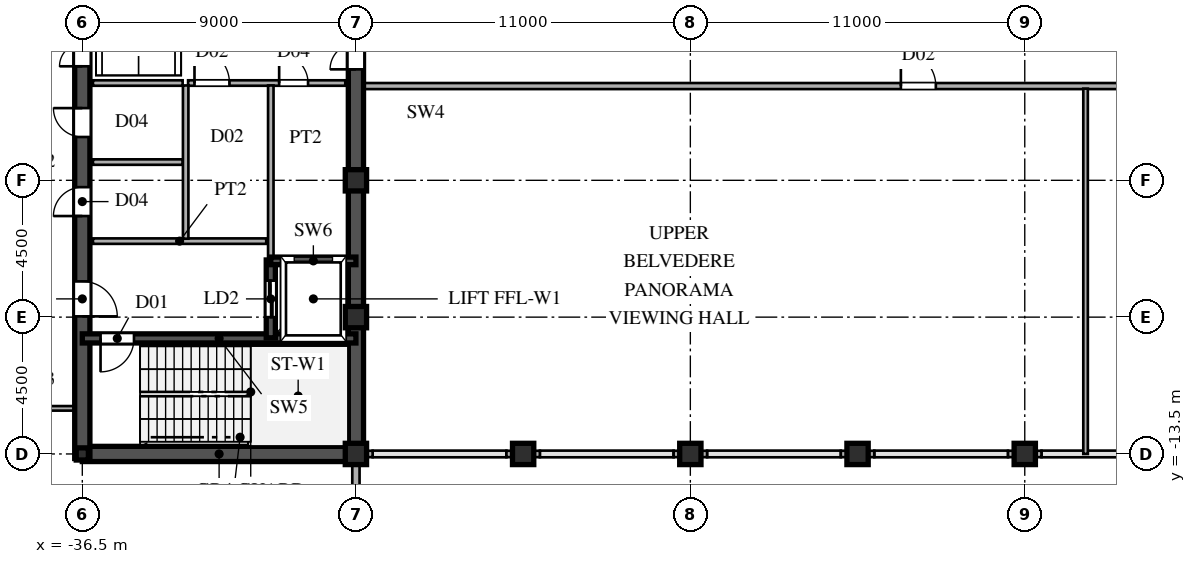
"""IFC4 building model, lengths in metres.
Left out: names, types, materials, properties, quantities, classifications, styles, units other than length and angle.
Written with IfcOpenShell. Run it as: python <this file> out.ifc"""

import sys

from ifc_helpers import new_model, si_unit, direction, frame, frame_2d, origin, origin_2d, place, context, subcontext, project, spatial, rectangle, hollow_rectangle, i_section, extrude, source, transform, mapped, element, fill, save


model = new_model("IFC4")
c1 = context("Model", 3, precision=1e-05, world=origin(), true_north=direction((0.0, 1.0)))
c2 = subcontext(c1, "Body", "Model", "MODEL_VIEW")
j1 = project(units=[si_unit("LENGTHUNIT", "METRE"), si_unit("PLANEANGLEUNIT", "RADIAN")], contexts=[c1])
p1 = place(None, origin())
s1 = spatial("IfcSite", under=j1, at=p1, CompositionType="ELEMENT")
p2 = place(p1, origin())
s2 = spatial("IfcBuilding", under=s1, at=p2, CompositionType="ELEMENT")
p3 = place(p2, frame((0.0, 0.0, 274.2)))
s3 = spatial("IfcBuildingStorey", under=s2, at=p3, CompositionType="ELEMENT", Elevation=274.2)
m1 = source(origin(), c2, "Body", "SweptSolid", [
    extrude(hollow_rectangle(XDim=0.7, YDim=0.7, WallThickness=0.03, at=origin_2d()), origin(), (0.0, 0.0, 1.0), 4.8),
])
for number, where, z_axis, x_axis in (
    (1, (-27.5, -13.5, 0.0), (0.0, 0.0, 1.0), (1.0, 0.0, 0.0)),
    (2, (-27.5, -9.0, 0.0), (0.0, 0.0, 1.0), (1.0, 0.0, 0.0)),
    (3, (-27.5, -4.5, 0.0), (0.0, 0.0, 1.0), (1.0, 0.0, 0.0)),
):
    element("IfcColumn", number, at=place(p3, frame(where, z_axis=z_axis, x_axis=x_axis)), inside=s3, PredefinedType="COLUMN", context=c2, shape_type="MappedRepresentation", body=[
        mapped(m1, transform((0.0, 0.0, 0.0), scale=1.0)),
    ])
m2 = source(origin(), c2, "Body", "SweptSolid", [
    extrude(i_section(OverallWidth=0.4, OverallDepth=0.4, WebThickness=0.013, FlangeThickness=0.021, at=origin_2d()), origin(), (0.0, 0.0, 1.0), 4.8),
])
p4 = place(p3, frame((-36.5, -13.5, 0.0), z_axis=(0.0, 0.0, 1.0), x_axis=(1.0, 0.0, 0.0)))
e4 = element("IfcColumn", 4, at=p4, inside=s3, PredefinedType="COLUMN", context=c2, shape_type="MappedRepresentation", body=[
    mapped(m2, transform((0.0, 0.0, 0.0), scale=1.0)),
])
for number, where, z_axis, x_axis in (
    (5, (-22.0, -13.5, 0.0), (0.0, 0.0, 1.0), (1.0, 0.0, 0.0)),
    (6, (-16.5, -13.5, 0.0), (0.0, 0.0, 1.0), (1.0, 0.0, 0.0)),
    (7, (-11.0, -13.5, 0.0), (0.0, 0.0, 1.0), (1.0, 0.0, 0.0)),
    (8, (-5.5, -13.5, 0.0), (0.0, 0.0, 1.0), (1.0, 0.0, 0.0)),
):
    element("IfcColumn", number, at=place(p3, frame(where, z_axis=z_axis, x_axis=x_axis)), inside=s3, PredefinedType="COLUMN", context=c2, shape_type="MappedRepresentation", body=[
        mapped(m1, transform((0.0, 0.0, 0.0), scale=1.0)),
    ])
p5 = place(p3, frame((-27.5, -15.98, 0.0), z_axis=(0.0, 0.0, 1.0), x_axis=(0.0, 1.0, 0.0)))
e9 = element("IfcWall", 9, at=p5, inside=s3, PredefinedType="SOLIDWALL", context=c2, shape_type="SweptSolid", body=[
    extrude(rectangle(XDim=1.605, YDim=0.24, at=frame_2d((0.803, 0.0))), origin(), (0.0, 0.0, 1.0), 4.52),
])
p6 = place(p3, frame((-27.5, -14.375, 0.0), z_axis=(0.0, 0.0, 1.0), x_axis=(0.0, 1.0, 0.0)))
e10 = element("IfcWall", 10, at=p6, inside=s3, PredefinedType="SOLIDWALL", context=c2, shape_type="SweptSolid", body=[
    extrude(rectangle(XDim=0.62, YDim=0.24, at=frame_2d((0.31, 0.0))), origin(), (0.0, 0.0, 1.0), 4.02),
])
p7 = place(p3, frame((-27.49, -13.5, 0.0), z_axis=(0.0, 0.0, 1.0), x_axis=(1.0, 0.0, 0.0)))
e11 = element("IfcWall", 11, at=p7, inside=s3, PredefinedType="SOLIDWALL", context=c2, shape_type="SweptSolid", body=[
    extrude(rectangle(XDim=0.54, YDim=0.21, at=frame_2d((0.27, 0.0))), origin(), (0.0, 0.0, 1.0), 4.02),
])
for number, where, z_axis, x_axis in (
    (12, (-22.55, -13.5, 0.0), (0.0, 0.0, 1.0), (1.0, 0.0, 0.0)),
    (13, (-17.05, -13.5, 0.0), (0.0, 0.0, 1.0), (1.0, 0.0, 0.0)),
    (14, (-11.55, -13.5, 0.0), (0.0, 0.0, 1.0), (1.0, 0.0, 0.0)),
    (15, (-6.05, -13.5, 0.0), (0.0, 0.0, 1.0), (1.0, 0.0, 0.0)),
):
    element("IfcWall", number, at=place(p3, frame(where, z_axis=z_axis, x_axis=x_axis)), inside=s3, PredefinedType="SOLIDWALL", context=c2, shape_type="SweptSolid", body=[
        extrude(rectangle(XDim=1.1, YDim=0.21, at=frame_2d((0.55, 0.0))), origin(), (0.0, 0.0, 1.0), 4.02),
    ])
p8 = place(p3, frame((-27.5, -13.5, 0.0), z_axis=(0.0, 0.0, 1.0), x_axis=(0.0, 1.0, 0.0)))
e16 = element("IfcWall", 16, at=p8, inside=s3, PredefinedType="SHEAR", context=c2, shape_type="SweptSolid", body=[
    extrude(rectangle(XDim=12.2, YDim=0.5, at=frame_2d((6.1, 0.0))), origin(), (0.0, 0.0, 1.0), 4.52),
])
p9 = place(p3, frame((-27.5, -1.3, 0.0), z_axis=(0.0, 0.0, 1.0), x_axis=(0.0, 1.0, 0.0)))
e17 = element("IfcWall", 17, at=p9, inside=s3, PredefinedType="SHEAR", context=c2, shape_type="SweptSolid", body=[
    extrude(rectangle(XDim=2.6, YDim=0.5, at=frame_2d((1.3, 0.0))), origin(), (0.0, 0.0, 1.0), 4.52),
])
p10 = place(p9, frame((0.45, 0.0, 0.0)))
e18 = element("IfcOpeningElement", 18, at=p10, cuts=e17, PredefinedType="OPENING", context=c2, shape_type="SweptSolid", body=[
    extrude(rectangle(XDim=1.7, YDim=2.35, at=frame_2d((0.85, 1.175))), frame((0.0, 0.26, 0.0), z_axis=(0.0, -1.0, 0.0), x_axis=(1.0, 0.0, 0.0)), (0.0, 0.0, 1.0), 0.52),
])
p11 = place(p3, frame((-36.5, -13.5, 0.0), z_axis=(0.0, 0.0, 1.0), x_axis=(1.0, 0.0, 0.0)))
e19 = element("IfcWall", 19, at=p11, inside=s3, PredefinedType="SHEAR", context=c2, shape_type="SweptSolid", body=[
    extrude(rectangle(XDim=9.0, YDim=0.5, at=frame_2d((4.5, 0.0))), origin(), (0.0, 0.0, 1.0), 4.52),
])
p12 = place(p3, frame((-36.5, -13.65, 0.0), z_axis=(0.0, 0.0, 1.0), x_axis=(0.0, 1.0, 0.0)))
e20 = element("IfcWall", 20, at=p12, inside=s3, PredefinedType="SHEAR", context=c2, shape_type="SweptSolid", body=[
    extrude(rectangle(XDim=7.15, YDim=0.5, at=frame_2d((3.575, 0.0))), origin(), (0.0, 0.0, 1.0), 4.52),
])
p13 = place(p12, frame((4.675, 0.0, 0.0)))
e21 = element("IfcOpeningElement", 21, at=p13, cuts=e20, PredefinedType="OPENING", context=c2, shape_type="SweptSolid", body=[
    extrude(rectangle(XDim=1.15, YDim=2.2, at=frame_2d((0.575, 1.1))), frame((0.0, 0.26, 0.0), z_axis=(0.0, -1.0, 0.0), x_axis=(1.0, 0.0, 0.0)), (0.0, 0.0, 1.0), 0.52),
])
p14 = place(p3, frame((-36.5, -1.3, 0.0), z_axis=(0.0, 0.0, 1.0), x_axis=(0.0, 1.0, 0.0)))
e22 = element("IfcWall", 22, at=p14, inside=s3, PredefinedType="SHEAR", context=c2, shape_type="SweptSolid", body=[
    extrude(rectangle(XDim=2.6, YDim=0.5, at=frame_2d((1.3, 0.0))), origin(), (0.0, 0.0, 1.0), 4.52),
])
p15 = place(p14, frame((0.55, 0.0, 0.0)))
e23 = element("IfcOpeningElement", 23, at=p15, cuts=e22, PredefinedType="OPENING", context=c2, shape_type="SweptSolid", body=[
    extrude(rectangle(XDim=1.5, YDim=2.3, at=frame_2d((0.75, 1.15))), frame((0.0, 0.26, 0.0), z_axis=(0.0, -1.0, 0.0), x_axis=(1.0, 0.0, 0.0)), (0.0, 0.0, 1.0), 0.52),
])
p16 = place(p3, frame((-36.5, -6.5, 0.0), z_axis=(0.0, 0.0, 1.0), x_axis=(0.0, 1.0, 0.0)))
e24 = element("IfcWall", 24, at=p16, inside=s3, PredefinedType="SHEAR", context=c2, shape_type="SweptSolid", body=[
    extrude(rectangle(XDim=2.6, YDim=0.5, at=frame_2d((1.3, 0.0))), origin(), (0.0, 0.0, 1.0), 4.52),
])
p17 = place(p16, frame((0.825, 0.0, 0.0)))
e25 = element("IfcOpeningElement", 25, at=p17, cuts=e24, PredefinedType="OPENING", context=c2, shape_type="SweptSolid", body=[
    extrude(rectangle(XDim=0.95, YDim=2.15, at=frame_2d((0.475, 1.075))), frame((0.0, 0.26, 0.0), z_axis=(0.0, -1.0, 0.0), x_axis=(1.0, 0.0, 0.0)), (0.0, 0.0, 1.0), 0.52),
])
p18 = place(p3, frame((-36.5, -3.9, 0.0), z_axis=(0.0, 0.0, 1.0), x_axis=(0.0, 1.0, 0.0)))
e26 = element("IfcWall", 26, at=p18, inside=s3, PredefinedType="SHEAR", context=c2, shape_type="SweptSolid", body=[
    extrude(rectangle(XDim=2.6, YDim=0.5, at=frame_2d((1.3, 0.0))), origin(), (0.0, 0.0, 1.0), 4.52),
])
p19 = place(p18, frame((0.825, 0.0, 0.0)))
e27 = element("IfcOpeningElement", 27, at=p19, cuts=e26, PredefinedType="OPENING", context=c2, shape_type="SweptSolid", body=[
    extrude(rectangle(XDim=0.95, YDim=2.15, at=frame_2d((0.475, 1.075))), frame((0.0, 0.26, 0.0), z_axis=(0.0, -1.0, 0.0), x_axis=(1.0, 0.0, 0.0)), (0.0, 0.0, 1.0), 0.52),
])
p20 = place(p3, frame((-36.5, -9.7, 0.0), z_axis=(0.0, 0.0, 1.0), x_axis=(1.0, 0.0, 0.0)))
e28 = element("IfcWall", 28, at=p20, inside=s3, PredefinedType="SHEAR", context=c2, shape_type="SweptSolid", body=[
    extrude(rectangle(XDim=9.0, YDim=0.3, at=frame_2d((4.5, 0.0))), origin(), (0.0, 0.0, 1.0), 4.52),
])
p21 = place(p20, frame((0.6, 0.0, 0.0)))
e29 = element("IfcOpeningElement", 29, at=p21, cuts=e28, PredefinedType="OPENING", context=c2, shape_type="SweptSolid", body=[
    extrude(rectangle(XDim=1.1, YDim=2.2, at=frame_2d((0.55, 1.1))), frame((0.0, 0.16, 0.0), z_axis=(0.0, -1.0, 0.0), x_axis=(1.0, 0.0, 0.0)), (0.0, 0.0, 1.0), 0.32),
])
p22 = place(p3, frame((-30.3, -7.15, 0.0), z_axis=(0.0, 0.0, 1.0), x_axis=(1.0, 0.0, 0.0)))
e30 = element("IfcWall", 30, at=p22, inside=s3, PredefinedType="SHEAR", context=c2, shape_type="SweptSolid", body=[
    extrude(rectangle(XDim=2.8, YDim=0.25, at=frame_2d((1.4, 0.0))), origin(), (0.0, 0.0, 1.0), 4.52),
])
p23 = place(p3, frame((-30.3, -9.68, 0.0), z_axis=(0.0, 0.0, 1.0), x_axis=(0.0, 1.0, 0.0)))
e31 = element("IfcWall", 31, at=p23, inside=s3, PredefinedType="SHEAR", context=c2, shape_type="SweptSolid", body=[
    extrude(rectangle(XDim=2.56, YDim=0.3, at=frame_2d((1.28, 0.0))), origin(), (0.0, 0.0, 1.0), 4.52),
])
p24 = place(p23, frame((0.68, 0.0, 0.0)))
e32 = element("IfcOpeningElement", 32, at=p24, cuts=e31, PredefinedType="OPENING", context=c2, shape_type="SweptSolid", body=[
    extrude(rectangle(XDim=1.2, YDim=2.25, at=frame_2d((0.6, 1.125))), frame((0.0, 0.16, 0.0), z_axis=(0.0, -1.0, 0.0), x_axis=(1.0, 0.0, 0.0)), (0.0, 0.0, 1.0), 0.32),
])
p25 = place(p3, frame((-36.15, -6.5, 0.0), z_axis=(0.0, 0.0, 1.0), x_axis=(1.0, 0.0, 0.0)))
e33 = element("IfcWall", 33, at=p25, inside=s3, PredefinedType="PARTITIONING", context=c2, shape_type="SweptSolid", body=[
    extrude(rectangle(XDim=5.7, YDim=0.18, at=frame_2d((2.85, 0.0))), origin(), (0.0, 0.0, 1.0), 4.52),
])
p26 = place(p3, frame((-33.1, -6.42, 0.0), z_axis=(0.0, 0.0, 1.0), x_axis=(0.0, 1.0, 0.0)))
e34 = element("IfcWall", 34, at=p26, inside=s3, PredefinedType="PARTITIONING", context=c2, shape_type="SweptSolid", body=[
    extrude(rectangle(XDim=5.04, YDim=0.18, at=frame_2d((2.52, 0.0))), origin(), (0.0, 0.0, 1.0), 4.52),
])
p27 = place(p3, frame((-30.3, -1.3, 0.0), z_axis=(0.0, 0.0, 1.0), x_axis=(1.0, 0.0, 0.0)))
e35 = element("IfcWall", 35, at=p27, inside=s3, PredefinedType="PARTITIONING", context=c2, shape_type="SweptSolid", body=[
    extrude(rectangle(XDim=2.45, YDim=0.18, at=frame_2d((1.225, 0.0))), origin(), (0.0, 0.0, 1.0), 4.52),
])
p28 = place(p27, frame((0.275, 0.0, 0.0)))
e36 = element("IfcOpeningElement", 36, at=p28, cuts=e35, PredefinedType="OPENING", context=c2, shape_type="SweptSolid", body=[
    extrude(rectangle(XDim=0.95, YDim=2.15, at=frame_2d((0.475, 1.075))), frame((0.0, 0.1, 0.0), z_axis=(0.0, -1.0, 0.0), x_axis=(1.0, 0.0, 0.0)), (0.0, 0.0, 1.0), 0.2),
])
p29 = place(p3, frame((-33.02, -1.3, 0.0), z_axis=(0.0, 0.0, 1.0), x_axis=(1.0, 0.0, 0.0)))
e37 = element("IfcWall", 37, at=p29, inside=s3, PredefinedType="PARTITIONING", context=c2, shape_type="SweptSolid", body=[
    extrude(rectangle(XDim=2.72, YDim=0.18, at=frame_2d((1.36, 0.0))), origin(), (0.0, 0.0, 1.0), 4.52),
])
p30 = place(p29, frame((0.21, 0.0, 0.0)))
e38 = element("IfcOpeningElement", 38, at=p30, cuts=e37, PredefinedType="OPENING", context=c2, shape_type="SweptSolid", body=[
    extrude(rectangle(XDim=1.15, YDim=2.2, at=frame_2d((0.575, 1.1))), frame((0.0, 0.1, 0.0), z_axis=(0.0, -1.0, 0.0), x_axis=(1.0, 0.0, 0.0)), (0.0, 0.0, 1.0), 0.2),
])
p31 = place(p3, frame((-30.3, -7.12, 0.0), z_axis=(0.0, 0.0, 1.0), x_axis=(0.0, 1.0, 0.0)))
e39 = element("IfcWall", 39, at=p31, inside=s3, PredefinedType="PARTITIONING", context=c2, shape_type="SweptSolid", body=[
    extrude(rectangle(XDim=5.74, YDim=0.18, at=frame_2d((2.87, 0.0))), origin(), (0.0, 0.0, 1.0), 4.52),
])
for number, where, z_axis, x_axis in (
    (40, (-36.15, -1.3, 0.0), (0.0, 0.0, 1.0), (1.0, 0.0, 0.0)),
    (41, (-36.15, -3.9, 0.0), (0.0, 0.0, 1.0), (1.0, 0.0, 0.0)),
):
    element("IfcWall", number, at=place(p3, frame(where, z_axis=z_axis, x_axis=x_axis)), inside=s3, PredefinedType="PARTITIONING", context=c2, shape_type="SweptSolid", body=[
        extrude(rectangle(XDim=2.95, YDim=0.18, at=frame_2d((1.475, 0.0))), origin(), (0.0, 0.0, 1.0), 4.52),
    ])
p32 = place(p3, frame((-39.115, -12.0, 0.0), z_axis=(0.0, 0.0, 1.0), x_axis=(1.0, 0.0, 0.0)))
e42 = element("IfcWall", 42, at=p32, inside=s3, PredefinedType="PARTITIONING", context=c2, shape_type="SweptSolid", body=[
    extrude(rectangle(XDim=2.36, YDim=0.15, at=frame_2d((1.18, 0.0))), origin(), (0.0, 0.0, 1.0), 4.52),
])
p33 = place(p3, frame((-27.245, -1.4, 0.0), z_axis=(0.0, 0.0, 1.0), x_axis=(1.0, 0.0, 0.0)))
e43 = element("IfcWall", 43, at=p33, inside=s3, PredefinedType="PARTITIONING", context=c2, shape_type="SweptSolid", body=[
    extrude(rectangle(XDim=54.49, YDim=0.2, at=frame_2d((27.245, 0.0))), origin(), (0.0, 0.0, 1.0), 4.52),
])
p34 = place(p33, frame((17.67, 0.0, 0.0)))
e44 = element("IfcOpeningElement", 44, at=p34, cuts=e43, PredefinedType="OPENING", context=c2, shape_type="SweptSolid", body=[
    extrude(rectangle(XDim=1.15, YDim=2.2, at=frame_2d((0.575, 1.1))), frame((0.0, 0.11, 0.0), z_axis=(0.0, -1.0, 0.0), x_axis=(1.0, 0.0, 0.0)), (0.0, 0.0, 1.0), 0.22),
])
p35 = place(p33, frame((35.17, 0.0, 0.0)))
e45 = element("IfcOpeningElement", 45, at=p35, cuts=e43, PredefinedType="OPENING", context=c2, shape_type="SweptSolid", body=[
    extrude(rectangle(XDim=1.15, YDim=2.2, at=frame_2d((0.575, 1.1))), frame((0.0, 0.11, 0.0), z_axis=(0.0, -1.0, 0.0), x_axis=(1.0, 0.0, 0.0)), (0.0, 0.0, 1.0), 0.22),
])
p36 = place(p3, frame((-3.5, -13.5, 0.0), z_axis=(0.0, 0.0, 1.0), x_axis=(0.0, 1.0, 0.0)))
e46 = element("IfcWall", 46, at=p36, inside=s3, PredefinedType="PARTITIONING", context=c2, shape_type="SweptSolid", body=[
    extrude(rectangle(XDim=12.015, YDim=0.15, at=frame_2d((6.007, 0.0))), origin(), (0.0, 0.0, 1.0), 4.52),
])
m3 = source(origin(), c2, "Body", "SweptSolid", [
    extrude(rectangle(XDim=1.7, YDim=2.35, at=frame_2d((0.85, 1.175))), frame((0.0, 0.025, 0.0), z_axis=(0.0, -1.0, 0.0), x_axis=(1.0, 0.0, 0.0)), (0.0, 0.0, 1.0), 0.05),
])
p37 = place(p10, origin())
e47 = element("IfcDoor", 47, at=p37, inside=s3, OperationType="DOUBLE_SWING_LEFT", PredefinedType="DOOR", context=c2, shape_type="MappedRepresentation", body=[
    mapped(m3, transform((0.0, 0.0, 0.0), scale=1.0)),
])
fill(e18, e47)
m4 = source(origin(), c2, "Body", "SweptSolid", [
    extrude(rectangle(XDim=1.15, YDim=2.2, at=frame_2d((0.575, 1.1))), frame((0.0, 0.025, 0.0), z_axis=(0.0, -1.0, 0.0), x_axis=(1.0, 0.0, 0.0)), (0.0, 0.0, 1.0), 0.05),
])
p38 = place(p13, frame((1.15, 0.0, 0.0), z_axis=(0.0, 0.0, 1.0), x_axis=(-1.0, 0.0, 0.0)))
e48 = element("IfcDoor", 48, at=p38, inside=s3, OperationType="SINGLE_SWING_LEFT", PredefinedType="DOOR", context=c2, shape_type="MappedRepresentation", body=[
    mapped(m4, transform((0.0, 0.0, 0.0), scale=1.0)),
])
fill(e21, e48)
m5 = source(origin(), c2, "Body", "SweptSolid", [
    extrude(rectangle(XDim=1.5, YDim=2.3, at=frame_2d((0.75, 1.15))), frame((0.0, 0.025, 0.0), z_axis=(0.0, -1.0, 0.0), x_axis=(1.0, 0.0, 0.0)), (0.0, 0.0, 1.0), 0.05),
])
p39 = place(p15, origin())
e49 = element("IfcDoor", 49, at=p39, inside=s3, OperationType="DOUBLE_SWING_LEFT", PredefinedType="DOOR", context=c2, shape_type="MappedRepresentation", body=[
    mapped(m5, transform((0.0, 0.0, 0.0), scale=1.0)),
])
fill(e23, e49)
m6 = source(origin(), c2, "Body", "SweptSolid", [
    extrude(rectangle(XDim=0.95, YDim=2.15, at=frame_2d((0.475, 1.075))), frame((0.0, 0.025, 0.0), z_axis=(0.0, -1.0, 0.0), x_axis=(1.0, 0.0, 0.0)), (0.0, 0.0, 1.0), 0.05),
])
p40 = place(p17, origin())
e50 = element("IfcDoor", 50, at=p40, inside=s3, OperationType="SINGLE_SWING_LEFT", PredefinedType="DOOR", context=c2, shape_type="MappedRepresentation", body=[
    mapped(m6, transform((0.0, 0.0, 0.0), scale=1.0)),
])
fill(e25, e50)
p41 = place(p19, origin())
e51 = element("IfcDoor", 51, at=p41, inside=s3, OperationType="SINGLE_SWING_RIGHT", PredefinedType="DOOR", context=c2, shape_type="MappedRepresentation", body=[
    mapped(m6, transform((0.0, 0.0, 0.0), scale=1.0)),
])
fill(e27, e51)
m7 = source(origin(), c2, "Body", "SweptSolid", [
    extrude(rectangle(XDim=1.1, YDim=2.2, at=frame_2d((0.55, 1.1))), frame((0.0, 0.025, 0.0), z_axis=(0.0, -1.0, 0.0), x_axis=(1.0, 0.0, 0.0)), (0.0, 0.0, 1.0), 0.05),
])
p42 = place(p21, frame((1.1, 0.0, 0.0), z_axis=(0.0, 0.0, 1.0), x_axis=(-1.0, 0.0, 0.0)))
e52 = element("IfcDoor", 52, at=p42, inside=s3, OperationType="SINGLE_SWING_LEFT", PredefinedType="DOOR", context=c2, shape_type="MappedRepresentation", body=[
    mapped(m7, transform((0.0, 0.0, 0.0), scale=1.0)),
])
fill(e29, e52)
m8 = source(origin(), c2, "Body", "SweptSolid", [
    extrude(rectangle(XDim=1.2, YDim=2.25, at=frame_2d((0.6, 1.125))), frame((0.0, 0.025, 0.0), z_axis=(0.0, -1.0, 0.0), x_axis=(1.0, 0.0, 0.0)), (0.0, 0.0, 1.0), 0.05),
])
p43 = place(p24, origin())
e53 = element("IfcDoor", 53, at=p43, inside=s3, OperationType="DOUBLE_DOOR_SLIDING", PredefinedType="DOOR", context=c2, shape_type="MappedRepresentation", body=[
    mapped(m8, transform((0.0, 0.0, 0.0), scale=1.0)),
])
fill(e32, e53)
p44 = place(p28, origin())
e54 = element("IfcDoor", 54, at=p44, inside=s3, OperationType="SINGLE_SWING_LEFT", PredefinedType="DOOR", context=c2, shape_type="MappedRepresentation", body=[
    mapped(m6, transform((0.0, 0.0, 0.0), scale=1.0)),
])
fill(e36, e54)
p45 = place(p30, origin())
e55 = element("IfcDoor", 55, at=p45, inside=s3, OperationType="SINGLE_SWING_LEFT", PredefinedType="DOOR", context=c2, shape_type="MappedRepresentation", body=[
    mapped(m4, transform((0.0, 0.0, 0.0), scale=1.0)),
])
fill(e38, e55)
p46 = place(p34, origin())
e56 = element("IfcDoor", 56, at=p46, inside=s3, OperationType="SINGLE_SWING_LEFT", PredefinedType="DOOR", context=c2, shape_type="MappedRepresentation", body=[
    mapped(m4, transform((0.0, 0.0, 0.0), scale=1.0)),
])
fill(e44, e56)
save(model, sys.argv[1])
